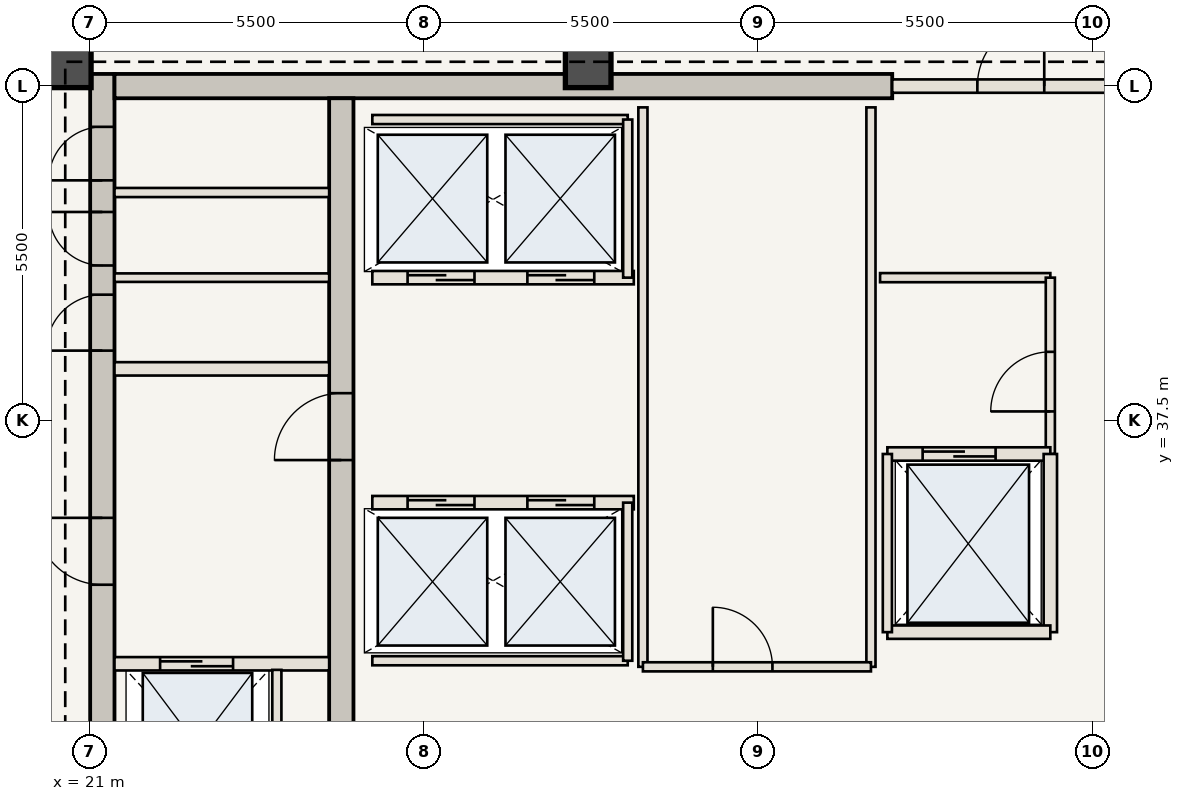
"""IFC4 building model, lengths in metres.
Left out: names, types, materials, properties, quantities, classifications, styles, units other than length and angle.
Written with IfcOpenShell. Run it as: python <this file> out.ifc"""

import sys

from ifc_helpers import new_model, si_unit, direction, frame, frame_2d, origin, origin_2d, place, context, subcontext, project, spatial, rectangle, extrude, element, fill, save


model = new_model("IFC4")
c1 = context("Model", 3, precision=1e-05, world=origin(), true_north=direction((0.0, 1.0)))
c2 = subcontext(c1, "Body", "Model", "MODEL_VIEW")
j1 = project(units=[si_unit("LENGTHUNIT", "METRE"), si_unit("PLANEANGLEUNIT", "RADIAN")], contexts=[c1])
p1 = place(None, origin())
s1 = spatial("IfcSite", under=j1, at=p1, CompositionType="ELEMENT")
p2 = place(p1, origin())
s2 = spatial("IfcBuilding", under=s1, at=p2, CompositionType="ELEMENT")
p3 = place(p2, frame((0.0, 0.0, 292.95)))
s3 = spatial("IfcBuildingStorey", under=s2, at=p3, CompositionType="ELEMENT", Elevation=292.95)
p4 = place(p3, frame((21.21, 30.6, 0.0), z_axis=(0.0, 0.0, 1.0), x_axis=(0.0, 1.0, 0.0)))
e1 = element("IfcWall", 1, at=p4, inside=s3, PredefinedType="SHEAR", context=c2, shape_type="SweptSolid", body=[
    extrude(rectangle(XDim=12.6, YDim=0.4, at=frame_2d((6.3, 0.0))), origin(), (0.0, 0.0, 1.0), 3.85),
])
p5 = place(p4, frame((4.2, 0.0, 0.0)))
e2 = element("IfcOpeningElement", 2, at=p5, cuts=e1, PredefinedType="OPENING", context=c2, shape_type="SweptSolid", body=[
    extrude(rectangle(XDim=1.1, YDim=2.15, at=frame_2d((0.55, 1.075))), frame((0.0, 0.21, 0.0), z_axis=(0.0, -1.0, 0.0), x_axis=(1.0, 0.0, 0.0)), (0.0, 0.0, 1.0), 0.42),
])
p6 = place(p4, frame((8.05, 0.0, 0.0)))
e3 = element("IfcOpeningElement", 3, at=p6, cuts=e1, PredefinedType="OPENING", context=c2, shape_type="SweptSolid", body=[
    extrude(rectangle(XDim=0.92, YDim=2.1, at=frame_2d((0.46, 1.05))), frame((0.0, 0.21, 0.0), z_axis=(0.0, -1.0, 0.0), x_axis=(1.0, 0.0, 0.0)), (0.0, 0.0, 1.0), 0.42),
])
p7 = place(p4, frame((9.45, 0.0, 0.0)))
e4 = element("IfcOpeningElement", 4, at=p7, cuts=e1, PredefinedType="OPENING", context=c2, shape_type="SweptSolid", body=[
    extrude(rectangle(XDim=0.88, YDim=2.1, at=frame_2d((0.44, 1.05))), frame((0.0, 0.21, 0.0), z_axis=(0.0, -1.0, 0.0), x_axis=(1.0, 0.0, 0.0)), (0.0, 0.0, 1.0), 0.42),
])
p8 = place(p4, frame((10.85, 0.0, 0.0)))
e5 = element("IfcOpeningElement", 5, at=p8, cuts=e1, PredefinedType="OPENING", context=c2, shape_type="SweptSolid", body=[
    extrude(rectangle(XDim=0.88, YDim=2.1, at=frame_2d((0.44, 1.05))), frame((0.0, 0.21, 0.0), z_axis=(0.0, -1.0, 0.0), x_axis=(1.0, 0.0, 0.0)), (0.0, 0.0, 1.0), 0.42),
])
p9 = place(p3, frame((21.41, 43.0, 0.0), z_axis=(0.0, 0.0, 1.0), x_axis=(1.0, 0.0, 0.0)))
e6 = element("IfcWall", 6, at=p9, inside=s3, PredefinedType="SHEAR", context=c2, shape_type="SweptSolid", body=[
    extrude(rectangle(XDim=12.79, YDim=0.4, at=frame_2d((6.395, 0.0))), origin(), (0.0, 0.0, 1.0), 3.85),
])
p10 = place(p3, frame((25.14, 30.6, 0.0), z_axis=(0.0, 0.0, 1.0), x_axis=(0.0, 1.0, 0.0)))
e7 = element("IfcWall", 7, at=p10, inside=s3, PredefinedType="SHEAR", context=c2, shape_type="SweptSolid", body=[
    extrude(rectangle(XDim=12.2, YDim=0.4, at=frame_2d((6.1, 0.0))), origin(), (0.0, 0.0, 1.0), 3.85),
])
p11 = place(p10, frame((6.25, 0.0, 0.0)))
e8 = element("IfcOpeningElement", 8, at=p11, cuts=e7, PredefinedType="OPENING", context=c2, shape_type="SweptSolid", body=[
    extrude(rectangle(XDim=1.1, YDim=2.15, at=frame_2d((0.55, 1.075))), frame((0.0, 0.21, 0.0), z_axis=(0.0, -1.0, 0.0), x_axis=(1.0, 0.0, 0.0)), (0.0, 0.0, 1.0), 0.42),
])
for number, where, z_axis, x_axis in (
    (9, (29.2, 43.35, 0.0), (0.0, 0.0, 1.0), (1.0, 0.0, 0.0)),
    (10, (20.65, 43.35, 0.0), (0.0, 0.0, 1.0), (1.0, 0.0, 0.0)),
):
    element("IfcColumn", number, at=place(p3, frame(where, z_axis=z_axis, x_axis=x_axis)), inside=s3, PredefinedType="COLUMN", context=c2, shape_type="SweptSolid", body=[
        extrude(rectangle(XDim=0.75, YDim=0.75, at=origin_2d()), origin(), (0.0, 0.0, 1.0), 3.85),
    ])
p12 = place(p3, frame((21.41, 33.5, 0.0), z_axis=(0.0, 0.0, 1.0), x_axis=(1.0, 0.0, 0.0)))
e11 = element("IfcWall", 11, at=p12, inside=s3, PredefinedType="STANDARD", context=c2, shape_type="SweptSolid", body=[
    extrude(rectangle(XDim=3.53, YDim=0.22, at=frame_2d((1.765, 0.0))), origin(), (0.0, 0.0, 1.0), 3.685),
])
p13 = place(p12, frame((0.75, 0.0, 0.0)))
e12 = element("IfcOpeningElement", 12, at=p13, cuts=e11, PredefinedType="OPENING", context=c2, shape_type="SweptSolid", body=[
    extrude(rectangle(XDim=1.2, YDim=2.2, at=frame_2d((0.6, 1.1))), frame((0.0, 0.12, 0.0), z_axis=(0.0, -1.0, 0.0), x_axis=(1.0, 0.0, 0.0)), (0.0, 0.0, 1.0), 0.24),
])
p14 = place(p3, frame((24.08, 30.75, 0.0), z_axis=(0.0, 0.0, 1.0), x_axis=(0.0, 1.0, 0.0)))
e13 = element("IfcWall", 13, at=p14, inside=s3, PredefinedType="STANDARD", context=c2, shape_type="SweptSolid", body=[
    extrude(rectangle(XDim=2.65, YDim=0.15, at=frame_2d((1.325, 0.0))), origin(), (0.0, 0.0, 1.0), 3.685),
])
p15 = place(p3, frame((21.41, 38.35, 0.0), z_axis=(0.0, 0.0, 1.0), x_axis=(1.0, 0.0, 0.0)))
e14 = element("IfcWall", 14, at=p15, inside=s3, PredefinedType="STANDARD", context=c2, shape_type="SweptSolid", body=[
    extrude(rectangle(XDim=3.53, YDim=0.22, at=frame_2d((1.765, 0.0))), origin(), (0.0, 0.0, 1.0), 3.685),
])
p16 = place(p3, frame((21.41, 39.85, 0.0), z_axis=(0.0, 0.0, 1.0), x_axis=(1.0, 0.0, 0.0)))
e15 = element("IfcWall", 15, at=p16, inside=s3, PredefinedType="STANDARD", context=c2, shape_type="SweptSolid", body=[
    extrude(rectangle(XDim=3.53, YDim=0.14, at=frame_2d((1.765, 0.0))), origin(), (0.0, 0.0, 1.0), 3.685),
])
p17 = place(p3, frame((21.41, 41.25, 0.0), z_axis=(0.0, 0.0, 1.0), x_axis=(1.0, 0.0, 0.0)))
e16 = element("IfcWall", 16, at=p17, inside=s3, PredefinedType="STANDARD", context=c2, shape_type="SweptSolid", body=[
    extrude(rectangle(XDim=3.53, YDim=0.15, at=frame_2d((1.765, 0.0))), origin(), (0.0, 0.0, 1.0), 3.685),
])
p18 = place(p3, frame((34.0, 39.85, 0.0), z_axis=(0.0, 0.0, 1.0), x_axis=(1.0, 0.0, 0.0)))
e17 = element("IfcWall", 17, at=p18, inside=s3, PredefinedType="STANDARD", context=c2, shape_type="SweptSolid", body=[
    extrude(rectangle(XDim=2.8, YDim=0.15, at=frame_2d((1.4, 0.0))), origin(), (0.0, 0.0, 1.0), 3.685),
])
p19 = place(p3, frame((36.8, 36.95, 0.0), z_axis=(0.0, 0.0, 1.0), x_axis=(0.0, 1.0, 0.0)))
e18 = element("IfcWall", 18, at=p19, inside=s3, PredefinedType="STANDARD", context=c2, shape_type="SweptSolid", body=[
    extrude(rectangle(XDim=2.9, YDim=0.15, at=frame_2d((1.45, 0.0))), origin(), (0.0, 0.0, 1.0), 3.685),
])
p20 = place(p19, frame((0.7, 0.0, 0.0)))
e19 = element("IfcOpeningElement", 19, at=p20, cuts=e18, PredefinedType="OPENING", context=c2, shape_type="SweptSolid", body=[
    extrude(rectangle(XDim=0.98, YDim=2.2, at=frame_2d((0.49, 1.1))), frame((0.0, 0.085, 0.0), z_axis=(0.0, -1.0, 0.0), x_axis=(1.0, 0.0, 0.0)), (0.0, 0.0, 1.0), 0.17),
])
p21 = place(p3, frame((25.65, 36.15, 0.0), z_axis=(0.0, 0.0, 1.0), x_axis=(1.0, 0.0, 0.0)))
e20 = element("IfcWall", 20, at=p21, inside=s3, PredefinedType="STANDARD", context=c2, shape_type="SweptSolid", body=[
    extrude(rectangle(XDim=4.3, YDim=0.22, at=frame_2d((2.15, 0.0))), origin(), (0.0, 0.0, 1.0), 3.685),
])
p22 = place(p21, frame((0.58, 0.0, 0.0)))
e21 = element("IfcOpeningElement", 21, at=p22, cuts=e20, PredefinedType="OPENING", context=c2, shape_type="SweptSolid", body=[
    extrude(rectangle(XDim=1.1, YDim=2.15, at=frame_2d((0.55, 1.075))), frame((0.0, 0.12, 0.0), z_axis=(0.0, -1.0, 0.0), x_axis=(1.0, 0.0, 0.0)), (0.0, 0.0, 1.0), 0.24),
])
p23 = place(p21, frame((2.55, 0.0, 0.0)))
e22 = element("IfcOpeningElement", 22, at=p23, cuts=e20, PredefinedType="OPENING", context=c2, shape_type="SweptSolid", body=[
    extrude(rectangle(XDim=1.1, YDim=2.15, at=frame_2d((0.55, 1.075))), frame((0.0, 0.12, 0.0), z_axis=(0.0, -1.0, 0.0), x_axis=(1.0, 0.0, 0.0)), (0.0, 0.0, 1.0), 0.24),
])
p24 = place(p3, frame((25.65, 33.55, 0.0), z_axis=(0.0, 0.0, 1.0), x_axis=(1.0, 0.0, 0.0)))
e23 = element("IfcWall", 23, at=p24, inside=s3, PredefinedType="STANDARD", context=c2, shape_type="SweptSolid", body=[
    extrude(rectangle(XDim=4.2, YDim=0.15, at=frame_2d((2.1, 0.0))), origin(), (0.0, 0.0, 1.0), 3.685),
])
p25 = place(p3, frame((29.85, 33.55, 0.0), z_axis=(0.0, 0.0, 1.0), x_axis=(0.0, 1.0, 0.0)))
e24 = element("IfcWall", 24, at=p25, inside=s3, PredefinedType="STANDARD", context=c2, shape_type="SweptSolid", body=[
    extrude(rectangle(XDim=2.6, YDim=0.15, at=frame_2d((1.3, 0.0))), origin(), (0.0, 0.0, 1.0), 3.685),
])
p26 = place(p3, frame((25.65, 39.85, 0.0), z_axis=(0.0, 0.0, 1.0), x_axis=(1.0, 0.0, 0.0)))
e25 = element("IfcWall", 25, at=p26, inside=s3, PredefinedType="STANDARD", context=c2, shape_type="SweptSolid", body=[
    extrude(rectangle(XDim=4.3, YDim=0.22, at=frame_2d((2.15, 0.0))), origin(), (0.0, 0.0, 1.0), 3.685),
])
p27 = place(p26, frame((0.58, 0.0, 0.0)))
e26 = element("IfcOpeningElement", 26, at=p27, cuts=e25, PredefinedType="OPENING", context=c2, shape_type="SweptSolid", body=[
    extrude(rectangle(XDim=1.1, YDim=2.15, at=frame_2d((0.55, 1.075))), frame((0.0, 0.12, 0.0), z_axis=(0.0, -1.0, 0.0), x_axis=(1.0, 0.0, 0.0)), (0.0, 0.0, 1.0), 0.24),
])
p28 = place(p26, frame((2.55, 0.0, 0.0)))
e27 = element("IfcOpeningElement", 27, at=p28, cuts=e25, PredefinedType="OPENING", context=c2, shape_type="SweptSolid", body=[
    extrude(rectangle(XDim=1.1, YDim=2.15, at=frame_2d((0.55, 1.075))), frame((0.0, 0.12, 0.0), z_axis=(0.0, -1.0, 0.0), x_axis=(1.0, 0.0, 0.0)), (0.0, 0.0, 1.0), 0.24),
])
p29 = place(p3, frame((25.65, 42.45, 0.0), z_axis=(0.0, 0.0, 1.0), x_axis=(1.0, 0.0, 0.0)))
e28 = element("IfcWall", 28, at=p29, inside=s3, PredefinedType="STANDARD", context=c2, shape_type="SweptSolid", body=[
    extrude(rectangle(XDim=4.2, YDim=0.15, at=frame_2d((2.1, 0.0))), origin(), (0.0, 0.0, 1.0), 3.685),
])
p30 = place(p3, frame((29.85, 39.85, 0.0), z_axis=(0.0, 0.0, 1.0), x_axis=(0.0, 1.0, 0.0)))
e29 = element("IfcWall", 29, at=p30, inside=s3, PredefinedType="STANDARD", context=c2, shape_type="SweptSolid", body=[
    extrude(rectangle(XDim=2.6, YDim=0.15, at=frame_2d((1.3, 0.0))), origin(), (0.0, 0.0, 1.0), 3.685),
])
for number, where, z_axis, x_axis in (
    (30, (30.1, 33.45, 0.0), (0.0, 0.0, 1.0), (0.0, 1.0, 0.0)),
    (31, (33.85, 33.45, 0.0), (0.0, 0.0, 1.0), (0.0, 1.0, 0.0)),
):
    element("IfcWall", number, at=place(p3, frame(where, z_axis=z_axis, x_axis=x_axis)), inside=s3, PredefinedType="STANDARD", context=c2, shape_type="SweptSolid", body=[
        extrude(rectangle(XDim=9.2, YDim=0.15, at=frame_2d((4.6, 0.0))), origin(), (0.0, 0.0, 1.0), 3.685),
    ])
p31 = place(p3, frame((30.1, 33.45, 0.0), z_axis=(0.0, 0.0, 1.0), x_axis=(1.0, 0.0, 0.0)))
e32 = element("IfcWall", 32, at=p31, inside=s3, PredefinedType="STANDARD", context=c2, shape_type="SweptSolid", body=[
    extrude(rectangle(XDim=3.75, YDim=0.15, at=frame_2d((1.875, 0.0))), origin(), (0.0, 0.0, 1.0), 3.685),
])
p32 = place(p31, frame((1.15, 0.0, 0.0)))
e33 = element("IfcOpeningElement", 33, at=p32, cuts=e32, PredefinedType="OPENING", context=c2, shape_type="SweptSolid", body=[
    extrude(rectangle(XDim=0.98, YDim=2.2, at=frame_2d((0.49, 1.1))), frame((0.0, 0.085, 0.0), z_axis=(0.0, -1.0, 0.0), x_axis=(1.0, 0.0, 0.0)), (0.0, 0.0, 1.0), 0.17),
])
p33 = place(p3, frame((34.2, 43.0, 0.0), z_axis=(0.0, 0.0, 1.0), x_axis=(1.0, 0.0, 0.0)))
e34 = element("IfcWall", 34, at=p33, inside=s3, PredefinedType="STANDARD", context=c2, shape_type="SweptSolid", body=[
    extrude(rectangle(XDim=3.55, YDim=0.22, at=frame_2d((1.775, 0.0))), origin(), (0.0, 0.0, 1.0), 3.685),
])
p34 = place(p33, frame((1.4, 0.0, 0.0)))
e35 = element("IfcOpeningElement", 35, at=p34, cuts=e34, PredefinedType="OPENING", context=c2, shape_type="SweptSolid", body=[
    extrude(rectangle(XDim=1.1, YDim=2.15, at=frame_2d((0.55, 1.075))), frame((0.0, 0.12, 0.0), z_axis=(0.0, -1.0, 0.0), x_axis=(1.0, 0.0, 0.0)), (0.0, 0.0, 1.0), 0.24),
])
p35 = place(p3, frame((34.12, 36.95, 0.0), z_axis=(0.0, 0.0, 1.0), x_axis=(1.0, 0.0, 0.0)))
e36 = element("IfcWall", 36, at=p35, inside=s3, PredefinedType="STANDARD", context=c2, shape_type="SweptSolid", body=[
    extrude(rectangle(XDim=2.68, YDim=0.22, at=frame_2d((1.34, 0.0))), origin(), (0.0, 0.0, 1.0), 3.685),
])
p36 = place(p35, frame((0.58, 0.0, 0.0)))
e37 = element("IfcOpeningElement", 37, at=p36, cuts=e36, PredefinedType="OPENING", context=c2, shape_type="SweptSolid", body=[
    extrude(rectangle(XDim=1.2, YDim=2.2, at=frame_2d((0.6, 1.1))), frame((0.0, 0.12, 0.0), z_axis=(0.0, -1.0, 0.0), x_axis=(1.0, 0.0, 0.0)), (0.0, 0.0, 1.0), 0.24),
])
p37 = place(p3, frame((36.8, 34.02, 0.0), z_axis=(0.0, 0.0, 1.0), x_axis=(0.0, 1.0, 0.0)))
e38 = element("IfcWall", 38, at=p37, inside=s3, PredefinedType="STANDARD", context=c2, shape_type="SweptSolid", body=[
    extrude(rectangle(XDim=2.93, YDim=0.22, at=frame_2d((1.465, 0.0))), origin(), (0.0, 0.0, 1.0), 3.685),
])
p38 = place(p3, frame((34.12, 34.02, 0.0), z_axis=(0.0, 0.0, 1.0), x_axis=(1.0, 0.0, 0.0)))
e39 = element("IfcWall", 39, at=p38, inside=s3, PredefinedType="STANDARD", context=c2, shape_type="SweptSolid", body=[
    extrude(rectangle(XDim=2.68, YDim=0.22, at=frame_2d((1.34, 0.0))), origin(), (0.0, 0.0, 1.0), 3.685),
])
p39 = place(p3, frame((34.12, 34.02, 0.0), z_axis=(0.0, 0.0, 1.0), x_axis=(0.0, 1.0, 0.0)))
e40 = element("IfcWall", 40, at=p39, inside=s3, PredefinedType="STANDARD", context=c2, shape_type="SweptSolid", body=[
    extrude(rectangle(XDim=2.93, YDim=0.15, at=frame_2d((1.465, 0.0))), origin(), (0.0, 0.0, 1.0), 3.685),
])
p40 = place(p5, origin())
e41 = element("IfcDoor", 41, at=p40, inside=s3, OperationType="SINGLE_SWING_RIGHT", PredefinedType="DOOR", context=c2, shape_type="SweptSolid", body=[
    extrude(rectangle(XDim=1.1, YDim=2.15, at=frame_2d((0.55, 1.075))), frame((0.0, 0.025, 0.0), z_axis=(0.0, -1.0, 0.0), x_axis=(1.0, 0.0, 0.0)), (0.0, 0.0, 1.0), 0.05),
])
fill(e2, e41)
p41 = place(p11, origin())
e42 = element("IfcDoor", 42, at=p41, inside=s3, OperationType="SINGLE_SWING_LEFT", PredefinedType="DOOR", context=c2, shape_type="SweptSolid", body=[
    extrude(rectangle(XDim=1.1, YDim=2.15, at=frame_2d((0.55, 1.075))), frame((0.0, 0.025, 0.0), z_axis=(0.0, -1.0, 0.0), x_axis=(1.0, 0.0, 0.0)), (0.0, 0.0, 1.0), 0.05),
])
fill(e8, e42)
p42 = place(p6, origin())
e43 = element("IfcDoor", 43, at=p42, inside=s3, OperationType="SINGLE_SWING_LEFT", PredefinedType="DOOR", context=c2, shape_type="SweptSolid", body=[
    extrude(rectangle(XDim=0.92, YDim=2.1, at=frame_2d((0.46, 1.05))), frame((0.0, 0.025, 0.0), z_axis=(0.0, -1.0, 0.0), x_axis=(1.0, 0.0, 0.0)), (0.0, 0.0, 1.0), 0.05),
])
fill(e3, e43)
p43 = place(p7, origin())
e44 = element("IfcDoor", 44, at=p43, inside=s3, OperationType="SINGLE_SWING_RIGHT", PredefinedType="DOOR", context=c2, shape_type="SweptSolid", body=[
    extrude(rectangle(XDim=0.88, YDim=2.1, at=frame_2d((0.44, 1.05))), frame((0.0, 0.025, 0.0), z_axis=(0.0, -1.0, 0.0), x_axis=(1.0, 0.0, 0.0)), (0.0, 0.0, 1.0), 0.05),
])
fill(e4, e44)
p44 = place(p8, origin())
e45 = element("IfcDoor", 45, at=p44, inside=s3, OperationType="SINGLE_SWING_LEFT", PredefinedType="DOOR", context=c2, shape_type="SweptSolid", body=[
    extrude(rectangle(XDim=0.88, YDim=2.1, at=frame_2d((0.44, 1.05))), frame((0.0, 0.025, 0.0), z_axis=(0.0, -1.0, 0.0), x_axis=(1.0, 0.0, 0.0)), (0.0, 0.0, 1.0), 0.05),
])
fill(e5, e45)
p45 = place(p13, origin())
e46 = element("IfcDoor", 46, at=p45, inside=s3, OperationType="DOUBLE_DOOR_SLIDING", PredefinedType="DOOR", context=c2, shape_type="SweptSolid", body=[
    extrude(rectangle(XDim=1.2, YDim=2.2, at=frame_2d((0.6, 1.1))), frame((0.0, 0.025, 0.0), z_axis=(0.0, -1.0, 0.0), x_axis=(1.0, 0.0, 0.0)), (0.0, 0.0, 1.0), 0.05),
])
fill(e12, e46)
p46 = place(p20, origin())
e47 = element("IfcDoor", 47, at=p46, inside=s3, OperationType="SINGLE_SWING_LEFT", PredefinedType="DOOR", context=c2, shape_type="SweptSolid", body=[
    extrude(rectangle(XDim=0.98, YDim=2.2, at=frame_2d((0.49, 1.1))), frame((0.0, 0.025, 0.0), z_axis=(0.0, -1.0, 0.0), x_axis=(1.0, 0.0, 0.0)), (0.0, 0.0, 1.0), 0.05),
])
fill(e19, e47)
p47 = place(p22, origin())
e48 = element("IfcDoor", 48, at=p47, inside=s3, OperationType="DOUBLE_DOOR_SLIDING", PredefinedType="DOOR", context=c2, shape_type="SweptSolid", body=[
    extrude(rectangle(XDim=1.1, YDim=2.15, at=frame_2d((0.55, 1.075))), frame((0.0, 0.025, 0.0), z_axis=(0.0, -1.0, 0.0), x_axis=(1.0, 0.0, 0.0)), (0.0, 0.0, 1.0), 0.05),
])
fill(e21, e48)
p48 = place(p23, origin())
e49 = element("IfcDoor", 49, at=p48, inside=s3, OperationType="DOUBLE_DOOR_SLIDING", PredefinedType="DOOR", context=c2, shape_type="SweptSolid", body=[
    extrude(rectangle(XDim=1.1, YDim=2.15, at=frame_2d((0.55, 1.075))), frame((0.0, 0.025, 0.0), z_axis=(0.0, -1.0, 0.0), x_axis=(1.0, 0.0, 0.0)), (0.0, 0.0, 1.0), 0.05),
])
fill(e22, e49)
p49 = place(p27, origin())
e50 = element("IfcDoor", 50, at=p49, inside=s3, OperationType="DOUBLE_DOOR_SLIDING", PredefinedType="DOOR", context=c2, shape_type="SweptSolid", body=[
    extrude(rectangle(XDim=1.1, YDim=2.15, at=frame_2d((0.55, 1.075))), frame((0.0, 0.025, 0.0), z_axis=(0.0, -1.0, 0.0), x_axis=(1.0, 0.0, 0.0)), (0.0, 0.0, 1.0), 0.05),
])
fill(e26, e50)
p50 = place(p28, origin())
e51 = element("IfcDoor", 51, at=p50, inside=s3, OperationType="DOUBLE_DOOR_SLIDING", PredefinedType="DOOR", context=c2, shape_type="SweptSolid", body=[
    extrude(rectangle(XDim=1.1, YDim=2.15, at=frame_2d((0.55, 1.075))), frame((0.0, 0.025, 0.0), z_axis=(0.0, -1.0, 0.0), x_axis=(1.0, 0.0, 0.0)), (0.0, 0.0, 1.0), 0.05),
])
fill(e27, e51)
p51 = place(p32, origin())
e52 = element("IfcDoor", 52, at=p51, inside=s3, OperationType="SINGLE_SWING_LEFT", PredefinedType="DOOR", context=c2, shape_type="SweptSolid", body=[
    extrude(rectangle(XDim=0.98, YDim=2.2, at=frame_2d((0.49, 1.1))), frame((0.0, 0.025, 0.0), z_axis=(0.0, -1.0, 0.0), x_axis=(1.0, 0.0, 0.0)), (0.0, 0.0, 1.0), 0.05),
])
fill(e33, e52)
p52 = place(p34, origin())
e53 = element("IfcDoor", 53, at=p52, inside=s3, OperationType="SINGLE_SWING_RIGHT", PredefinedType="DOOR", context=c2, shape_type="SweptSolid", body=[
    extrude(rectangle(XDim=1.1, YDim=2.15, at=frame_2d((0.55, 1.075))), frame((0.0, 0.025, 0.0), z_axis=(0.0, -1.0, 0.0), x_axis=(1.0, 0.0, 0.0)), (0.0, 0.0, 1.0), 0.05),
])
fill(e35, e53)
p53 = place(p36, origin())
e54 = element("IfcDoor", 54, at=p53, inside=s3, OperationType="DOUBLE_DOOR_SLIDING", PredefinedType="DOOR", context=c2, shape_type="SweptSolid", body=[
    extrude(rectangle(XDim=1.2, YDim=2.2, at=frame_2d((0.6, 1.1))), frame((0.0, 0.025, 0.0), z_axis=(0.0, -1.0, 0.0), x_axis=(1.0, 0.0, 0.0)), (0.0, 0.0, 1.0), 0.05),
])
fill(e37, e54)
save(model, sys.argv[1])
